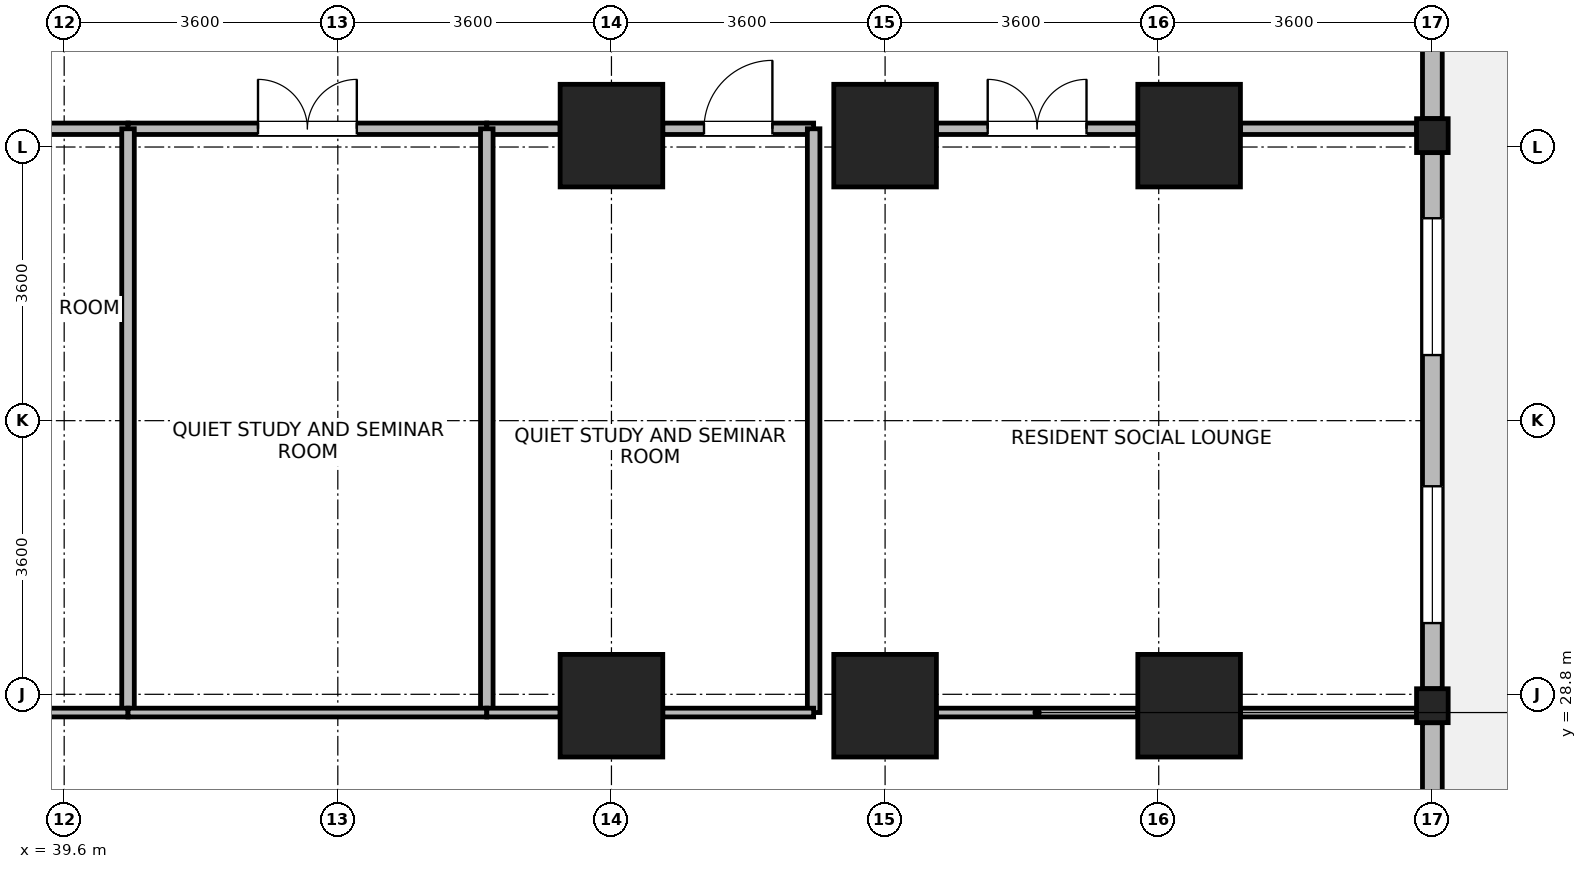
"""IFC4 building model, lengths in metres.
Left out: names, types, materials, properties, quantities, classifications, styles, units other than length and angle.
Written with IfcOpenShell. Run it as: python <this file> out.ifc"""

import sys

from ifc_helpers import new_model, si_unit, direction, frame, frame_2d, origin, origin_2d, place, context, subcontext, project, spatial, rectangle, i_section, extrude, source, transform, mapped, element, fill, save


model = new_model("IFC4")
c1 = context("Model", 3, precision=1e-05, world=origin(), true_north=direction((0.0, 1.0)))
c2 = subcontext(c1, "Body", "Model", "MODEL_VIEW")
j1 = project(units=[si_unit("LENGTHUNIT", "METRE"), si_unit("PLANEANGLEUNIT", "RADIAN")], contexts=[c1])
p1 = place(None, origin())
s1 = spatial("IfcSite", under=j1, at=p1, CompositionType="ELEMENT")
p2 = place(p1, origin())
s2 = spatial("IfcBuilding", under=s1, at=p2, CompositionType="ELEMENT")
p3 = place(p2, frame((0.0, 0.0, 25.3)))
s3 = spatial("IfcBuildingStorey", under=s2, at=p3, CompositionType="ELEMENT", Elevation=25.3)
m1 = source(origin(), c2, "Body", "SweptSolid", [
    extrude(rectangle(XDim=1.35, YDim=1.35, at=origin_2d()), origin(), (0.0, 0.0, 1.0), 3.7),
])
for number, where, z_axis, x_axis in (
    (1, (46.8, 28.65, 0.0), (0.0, 0.0, 1.0), (1.0, 0.0, 0.0)),
    (2, (46.8, 36.15, 0.0), (0.0, 0.0, 1.0), (1.0, 0.0, 0.0)),
    (3, (50.4, 28.65, 0.0), (0.0, 0.0, 1.0), (1.0, 0.0, 0.0)),
    (4, (50.4, 36.15, 0.0), (0.0, 0.0, 1.0), (1.0, 0.0, 0.0)),
    (5, (54.4, 28.65, 0.0), (0.0, 0.0, 1.0), (1.0, 0.0, 0.0)),
    (6, (54.4, 36.15, 0.0), (0.0, 0.0, 1.0), (1.0, 0.0, 0.0)),
):
    element("IfcColumn", number, at=place(p3, frame(where, z_axis=z_axis, x_axis=x_axis)), inside=s3, PredefinedType="COLUMN", context=c2, shape_type="MappedRepresentation", body=[
        mapped(m1, transform((0.0, 0.0, 0.0), x_axis=(1.0, 0.0, 0.0), y_axis=(0.0, 1.0, 0.0), z_axis=(0.0, 0.0, 1.0), scale=1.0)),
    ])
m2 = source(origin(), c2, "Body", "SweptSolid", [
    extrude(i_section(OverallWidth=0.416, OverallDepth=0.446, WebThickness=0.029, FlangeThickness=0.04, FilletRadius=0.015, at=origin_2d()), origin(), (0.0, 0.0, 1.0), 3.7),
])
for number, where, z_axis, x_axis in (
    (7, (57.6, 28.65, 0.0), (0.0, 0.0, 1.0), (1.0, 0.0, 0.0)),
    (8, (57.6, 36.15, 0.0), (0.0, 0.0, 1.0), (1.0, 0.0, 0.0)),
):
    element("IfcColumn", number, at=place(p3, frame(where, z_axis=z_axis, x_axis=x_axis)), inside=s3, PredefinedType="COLUMN", context=c2, shape_type="MappedRepresentation", body=[
        mapped(m2, transform((0.0, 0.0, 0.0), x_axis=(1.0, 0.0, 0.0), y_axis=(0.0, 1.0, 0.0), z_axis=(0.0, 0.0, 1.0), scale=1.0)),
    ])
p4 = place(p3, frame((57.6, 28.426, 0.0), z_axis=(0.0, 0.0, 1.0), x_axis=(0.0, -1.0, 0.0)))
e9 = element("IfcWall", 9, at=p4, inside=s3, PredefinedType="STANDARD", context=c2, shape_type="SweptSolid", body=[
    extrude(rectangle(XDim=6.602, YDim=0.26, at=frame_2d((3.301, 0.0))), origin(), (0.0, 0.0, 1.0), 2.93),
])
p5 = place(p4, frame((4.052, 0.0, 0.85)))
e10 = element("IfcOpeningElement", 10, at=p5, cuts=e9, PredefinedType="OPENING", context=c2, shape_type="SweptSolid", body=[
    extrude(rectangle(XDim=1.8, YDim=1.85, at=frame_2d((0.9, 0.925))), frame((0.0, 0.14, 0.0), z_axis=(0.0, -1.0, 0.0), x_axis=(1.0, 0.0, 0.0)), (0.0, 0.0, 1.0), 0.28),
])
p6 = place(p4, frame((2.298, 0.0, 0.85)))
e11 = element("IfcOpeningElement", 11, at=p6, cuts=e9, PredefinedType="OPENING", context=c2, shape_type="SweptSolid", body=[
    extrude(rectangle(XDim=0.95, YDim=1.75, at=frame_2d((0.475, 0.875))), frame((0.0, 0.14, 0.0), z_axis=(0.0, -1.0, 0.0), x_axis=(1.0, 0.0, 0.0)), (0.0, 0.0, 1.0), 0.28),
])
p7 = place(p3, frame((57.6, 35.926, 0.0), z_axis=(0.0, 0.0, 1.0), x_axis=(0.0, -1.0, 0.0)))
e12 = element("IfcWall", 12, at=p7, inside=s3, PredefinedType="STANDARD", context=c2, shape_type="SweptSolid", body=[
    extrude(rectangle(XDim=7.052, YDim=0.26, at=frame_2d((3.526, 0.0))), origin(), (0.0, 0.0, 1.0), 2.93),
])
p8 = place(p7, frame((0.863, 0.0, 0.85)))
e13 = element("IfcOpeningElement", 13, at=p8, cuts=e12, PredefinedType="OPENING", context=c2, shape_type="SweptSolid", body=[
    extrude(rectangle(XDim=1.8, YDim=1.85, at=frame_2d((0.9, 0.925))), frame((0.0, 0.14, 0.0), z_axis=(0.0, -1.0, 0.0), x_axis=(1.0, 0.0, 0.0)), (0.0, 0.0, 1.0), 0.28),
])
p9 = place(p7, frame((4.389, 0.0, 0.85)))
e14 = element("IfcOpeningElement", 14, at=p9, cuts=e12, PredefinedType="OPENING", context=c2, shape_type="SweptSolid", body=[
    extrude(rectangle(XDim=1.8, YDim=1.85, at=frame_2d((0.9, 0.925))), frame((0.0, 0.14, 0.0), z_axis=(0.0, -1.0, 0.0), x_axis=(1.0, 0.0, 0.0)), (0.0, 0.0, 1.0), 0.28),
])
p10 = place(p3, frame((57.6, 43.33, 0.0), z_axis=(0.0, 0.0, 1.0), x_axis=(0.0, -1.0, 0.0)))
e15 = element("IfcWall", 15, at=p10, inside=s3, PredefinedType="STANDARD", context=c2, shape_type="SweptSolid", body=[
    extrude(rectangle(XDim=6.956, YDim=0.26, at=frame_2d((3.478, 0.0))), origin(), (0.0, 0.0, 1.0), 3.43),
])
p11 = place(p10, frame((0.389, 0.0, 0.85)))
e16 = element("IfcOpeningElement", 16, at=p11, cuts=e15, PredefinedType="OPENING", context=c2, shape_type="SweptSolid", body=[
    extrude(rectangle(XDim=2.7, YDim=2.05, at=frame_2d((1.35, 1.025))), frame((0.0, 0.14, 0.0), z_axis=(0.0, -1.0, 0.0), x_axis=(1.0, 0.0, 0.0)), (0.0, 0.0, 1.0), 0.28),
])
p12 = place(p10, frame((3.56, 0.0, 0.85)))
e17 = element("IfcOpeningElement", 17, at=p12, cuts=e15, PredefinedType="OPENING", context=c2, shape_type="SweptSolid", body=[
    extrude(rectangle(XDim=0.95, YDim=1.75, at=frame_2d((0.475, 0.875))), frame((0.0, 0.14, 0.0), z_axis=(0.0, -1.0, 0.0), x_axis=(1.0, 0.0, 0.0)), (0.0, 0.0, 1.0), 0.28),
])
p13 = place(p3, frame((51.075, 36.24, 0.0), z_axis=(0.0, 0.0, 1.0), x_axis=(1.0, 0.0, 0.0)))
e18 = element("IfcWall", 18, at=p13, inside=s3, PredefinedType="PARTITIONING", context=c2, shape_type="SweptSolid", body=[
    extrude(rectangle(XDim=2.65, YDim=0.15, at=frame_2d((1.325, 0.0))), origin(), (0.0, 0.0, 1.0), 2.78),
])
p14 = place(p13, frame((0.675, 0.0, 0.0)))
e19 = element("IfcOpeningElement", 19, at=p14, cuts=e18, PredefinedType="OPENING", context=c2, shape_type="SweptSolid", body=[
    extrude(rectangle(XDim=1.3, YDim=2.12, at=frame_2d((0.65, 1.06))), frame((0.0, 0.085, 0.0), z_axis=(0.0, -1.0, 0.0), x_axis=(1.0, 0.0, 0.0)), (0.0, 0.0, 1.0), 0.17),
])
p15 = place(p3, frame((55.075, 36.24, 0.0), z_axis=(0.0, 0.0, 1.0), x_axis=(1.0, 0.0, 0.0)))
e20 = element("IfcWall", 20, at=p15, inside=s3, PredefinedType="PARTITIONING", context=c2, shape_type="SweptSolid", body=[
    extrude(rectangle(XDim=2.317, YDim=0.15, at=frame_2d((1.159, 0.0))), origin(), (0.0, 0.0, 1.0), 2.78),
])
p16 = place(p3, frame((36.675, 36.24, 0.0), z_axis=(0.0, 0.0, 1.0), x_axis=(1.0, 0.0, 0.0)))
e21 = element("IfcWall", 21, at=p16, inside=s3, PredefinedType="PARTITIONING", context=c2, shape_type="SweptSolid", body=[
    extrude(rectangle(XDim=3.765, YDim=0.15, at=frame_2d((1.882, 0.0))), origin(), (0.0, 0.0, 1.0), 2.78),
])
p17 = place(p3, frame((40.44, 36.24, 0.0), z_axis=(0.0, 0.0, 1.0), x_axis=(1.0, 0.0, 0.0)))
e22 = element("IfcWall", 22, at=p17, inside=s3, PredefinedType="PARTITIONING", context=c2, shape_type="SweptSolid", body=[
    extrude(rectangle(XDim=4.72, YDim=0.15, at=frame_2d((2.36, 0.0))), origin(), (0.0, 0.0, 1.0), 2.78),
])
p18 = place(p17, frame((1.71, 0.0, 0.0)))
e23 = element("IfcOpeningElement", 23, at=p18, cuts=e22, PredefinedType="OPENING", context=c2, shape_type="SweptSolid", body=[
    extrude(rectangle(XDim=1.3, YDim=2.12, at=frame_2d((0.65, 1.06))), frame((0.0, 0.085, 0.0), z_axis=(0.0, -1.0, 0.0), x_axis=(1.0, 0.0, 0.0)), (0.0, 0.0, 1.0), 0.17),
])
p19 = place(p3, frame((45.16, 36.24, 0.0), z_axis=(0.0, 0.0, 1.0), x_axis=(1.0, 0.0, 0.0)))
e24 = element("IfcWall", 24, at=p19, inside=s3, PredefinedType="PARTITIONING", context=c2, shape_type="SweptSolid", body=[
    extrude(rectangle(XDim=0.965, YDim=0.15, at=frame_2d((0.482, 0.0))), origin(), (0.0, 0.0, 1.0), 2.78),
])
p20 = place(p3, frame((47.475, 36.24, 0.0), z_axis=(0.0, 0.0, 1.0), x_axis=(1.0, 0.0, 0.0)))
e25 = element("IfcWall", 25, at=p20, inside=s3, PredefinedType="PARTITIONING", context=c2, shape_type="SweptSolid", body=[
    extrude(rectangle(XDim=1.985, YDim=0.15, at=frame_2d((0.992, 0.0))), origin(), (0.0, 0.0, 1.0), 2.78),
])
p21 = place(p20, frame((0.542, 0.0, 0.0)))
e26 = element("IfcOpeningElement", 26, at=p21, cuts=e25, PredefinedType="OPENING", context=c2, shape_type="SweptSolid", body=[
    extrude(rectangle(XDim=0.9, YDim=2.08, at=frame_2d((0.45, 1.04))), frame((0.0, 0.085, 0.0), z_axis=(0.0, -1.0, 0.0), x_axis=(1.0, 0.0, 0.0)), (0.0, 0.0, 1.0), 0.17),
])
p22 = place(p3, frame((51.075, 28.56, 0.0), z_axis=(0.0, 0.0, 1.0), x_axis=(1.0, 0.0, 0.0)))
e27 = element("IfcWall", 27, at=p22, inside=s3, PredefinedType="PARTITIONING", context=c2, shape_type="SweptSolid", body=[
    extrude(rectangle(XDim=2.65, YDim=0.115, at=frame_2d((1.325, 0.0))), origin(), (0.0, 0.0, 1.0), 2.78),
])
p23 = place(p3, frame((55.075, 28.56, 0.0), z_axis=(0.0, 0.0, 1.0), x_axis=(1.0, 0.0, 0.0)))
e28 = element("IfcWall", 28, at=p23, inside=s3, PredefinedType="PARTITIONING", context=c2, shape_type="SweptSolid", body=[
    extrude(rectangle(XDim=2.317, YDim=0.115, at=frame_2d((1.159, 0.0))), origin(), (0.0, 0.0, 1.0), 2.78),
])
for number, where, z_axis, x_axis in (
    (29, (40.44, 28.56, 0.0), (0.0, 0.0, 1.0), (0.0, 1.0, 0.0)),
    (30, (45.16, 28.56, 0.0), (0.0, 0.0, 1.0), (0.0, 1.0, 0.0)),
    (31, (49.46, 28.56, 0.0), (0.0, 0.0, 1.0), (0.0, 1.0, 0.0)),
):
    element("IfcWall", number, at=place(p3, frame(where, z_axis=z_axis, x_axis=x_axis)), inside=s3, PredefinedType="PARTITIONING", context=c2, shape_type="SweptSolid", body=[
        extrude(rectangle(XDim=7.68, YDim=0.165, at=frame_2d((3.84, 0.0))), origin(), (0.0, 0.0, 1.0), 3.43),
    ])
p24 = place(p3, frame((36.675, 28.56, 0.0), z_axis=(0.0, 0.0, 1.0), x_axis=(1.0, 0.0, 0.0)))
e32 = element("IfcWall", 32, at=p24, inside=s3, PredefinedType="PARTITIONING", context=c2, shape_type="SweptSolid", body=[
    extrude(rectangle(XDim=3.765, YDim=0.115, at=frame_2d((1.882, 0.0))), origin(), (0.0, 0.0, 1.0), 2.78),
])
p25 = place(p3, frame((40.44, 28.56, 0.0), z_axis=(0.0, 0.0, 1.0), x_axis=(1.0, 0.0, 0.0)))
e33 = element("IfcWall", 33, at=p25, inside=s3, PredefinedType="PARTITIONING", context=c2, shape_type="SweptSolid", body=[
    extrude(rectangle(XDim=4.72, YDim=0.115, at=frame_2d((2.36, 0.0))), origin(), (0.0, 0.0, 1.0), 2.78),
])
p26 = place(p3, frame((45.16, 28.56, 0.0), z_axis=(0.0, 0.0, 1.0), x_axis=(1.0, 0.0, 0.0)))
e34 = element("IfcWall", 34, at=p26, inside=s3, PredefinedType="PARTITIONING", context=c2, shape_type="SweptSolid", body=[
    extrude(rectangle(XDim=0.965, YDim=0.115, at=frame_2d((0.482, 0.0))), origin(), (0.0, 0.0, 1.0), 2.78),
])
p27 = place(p3, frame((47.475, 28.56, 0.0), z_axis=(0.0, 0.0, 1.0), x_axis=(1.0, 0.0, 0.0)))
e35 = element("IfcWall", 35, at=p27, inside=s3, PredefinedType="PARTITIONING", context=c2, shape_type="SweptSolid", body=[
    extrude(rectangle(XDim=1.985, YDim=0.115, at=frame_2d((0.992, 0.0))), origin(), (0.0, 0.0, 1.0), 2.78),
])
p28 = place(p8, origin())
e36 = element("IfcWindow", 36, at=p28, inside=s3, PartitioningType="SINGLE_PANEL", PredefinedType="WINDOW", context=c2, shape_type="SweptSolid", body=[
    extrude(rectangle(XDim=1.8, YDim=1.85, at=frame_2d((0.9, 0.925))), frame((0.0, 0.03, 0.0), z_axis=(0.0, -1.0, 0.0), x_axis=(1.0, 0.0, 0.0)), (0.0, 0.0, 1.0), 0.06),
])
fill(e13, e36)
p29 = place(p9, origin())
e37 = element("IfcWindow", 37, at=p29, inside=s3, PartitioningType="SINGLE_PANEL", PredefinedType="WINDOW", context=c2, shape_type="SweptSolid", body=[
    extrude(rectangle(XDim=1.8, YDim=1.85, at=frame_2d((0.9, 0.925))), frame((0.0, 0.03, 0.0), z_axis=(0.0, -1.0, 0.0), x_axis=(1.0, 0.0, 0.0)), (0.0, 0.0, 1.0), 0.06),
])
fill(e14, e37)
p30 = place(p14, origin())
e38 = element("IfcDoor", 38, at=p30, inside=s3, OperationType="DOUBLE_DOOR_SINGLE_SWING", PredefinedType="DOOR", context=c2, shape_type="SweptSolid", body=[
    extrude(rectangle(XDim=1.3, YDim=2.12, at=frame_2d((0.65, 1.06))), frame((0.0, 0.025, 0.0), z_axis=(0.0, -1.0, 0.0), x_axis=(1.0, 0.0, 0.0)), (0.0, 0.0, 1.0), 0.05),
])
fill(e19, e38)
p31 = place(p18, origin())
e39 = element("IfcDoor", 39, at=p31, inside=s3, OperationType="DOUBLE_DOOR_SINGLE_SWING", PredefinedType="DOOR", context=c2, shape_type="SweptSolid", body=[
    extrude(rectangle(XDim=1.3, YDim=2.12, at=frame_2d((0.65, 1.06))), frame((0.0, 0.025, 0.0), z_axis=(0.0, -1.0, 0.0), x_axis=(1.0, 0.0, 0.0)), (0.0, 0.0, 1.0), 0.05),
])
fill(e23, e39)
p32 = place(p21, origin())
e40 = element("IfcDoor", 40, at=p32, inside=s3, OperationType="SINGLE_SWING_RIGHT", PredefinedType="DOOR", context=c2, shape_type="SweptSolid", body=[
    extrude(rectangle(XDim=0.9, YDim=2.08, at=frame_2d((0.45, 1.04))), frame((0.0, 0.025, 0.0), z_axis=(0.0, -1.0, 0.0), x_axis=(1.0, 0.0, 0.0)), (0.0, 0.0, 1.0), 0.05),
])
fill(e26, e40)
save(model, sys.argv[1])
